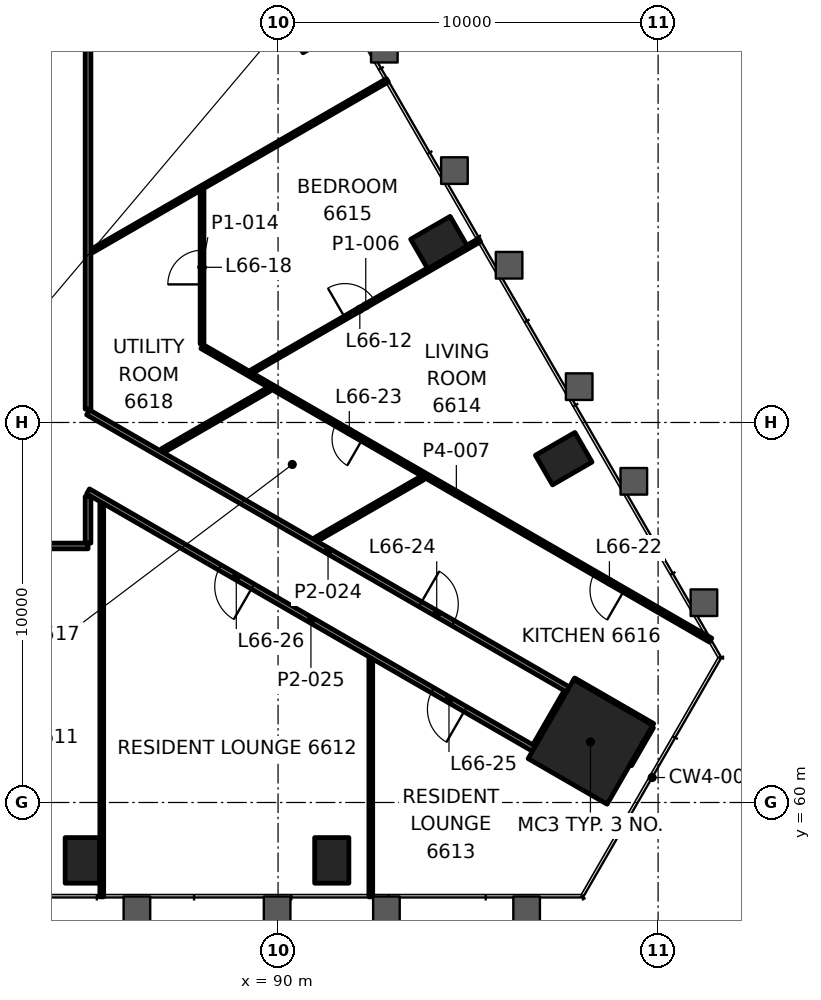
"""IFC4 building model, lengths in metres.
Left out: names, types, materials, properties, quantities, classifications, styles, units other than length and angle.
Written with IfcOpenShell. Run it as: python <this file> out.ifc"""

import sys

from ifc_helpers import new_model, si_unit, direction, frame, frame_2d, origin, origin_2d, place, context, subcontext, project, spatial, rectangle, hollow_rectangle, extrude, element, fill, save


model = new_model("IFC4")
c1 = context("Model", 3, precision=1e-05, world=origin(), true_north=direction((0.0, 1.0)))
c2 = subcontext(c1, "Body", "Model", "MODEL_VIEW")
j1 = project(units=[si_unit("LENGTHUNIT", "METRE"), si_unit("PLANEANGLEUNIT", "RADIAN")], contexts=[c1])
p1 = place(None, origin())
s1 = spatial("IfcSite", under=j1, at=p1, CompositionType="ELEMENT")
p2 = place(p1, origin())
s2 = spatial("IfcBuilding", under=s1, at=p2, CompositionType="ELEMENT")
p3 = place(p2, frame((0.0, 0.0, 277.6)))
s3 = spatial("IfcBuildingStorey", under=s2, at=p3, CompositionType="ELEMENT", Elevation=277.6)
p4 = place(p3, frame((98.22, 61.594, 0.0), z_axis=(0.0, 0.0, 1.0), x_axis=(0.5, 0.866025403784, 0.0)))
e1 = element("IfcColumn", 1, at=p4, inside=s3, PredefinedType="COLUMN", context=c2, shape_type="SweptSolid", body=[
    extrude(rectangle(XDim=2.4, YDim=2.4, at=origin_2d()), origin(), (0.0, 0.0, 1.0), 3.5),
])
for number, where, z_axis, x_axis in (
    (2, (84.848, 58.476, -0.0), (0.0, 0.0, 1.0), (1.0, 0.0, 0.0)),
    (3, (91.413, 58.476, -0.0), (0.0, 0.0, 1.0), (1.0, 0.0, 0.0)),
    (4, (97.517, 69.047, -0.0), (0.0, 0.0, 1.0), (-0.5, 0.866, 0.0)),
    (5, (94.234, 74.733, -0.0), (0.0, 0.0, 1.0), (-0.5, 0.866, 0.0)),
    (6, (90.951, 80.419, -0.0), (0.0, 0.0, 1.0), (-0.5, 0.866, 0.0)),
):
    element("IfcColumn", number, at=place(p3, frame(where, z_axis=z_axis, x_axis=x_axis)), inside=s3, PredefinedType="COLUMN", context=c2, shape_type="SweptSolid", body=[
        extrude(hollow_rectangle(XDim=0.9, YDim=1.2, WallThickness=0.06, at=origin_2d()), origin(), (0.0, 0.0, 1.0), 3.5),
    ])
p5 = place(p3, frame((85.0, 66.75, 0.0), z_axis=(0.0, 0.0, 1.0), x_axis=(-1.0, 0.0, 0.0)))
e7 = element("IfcWall", 7, at=p5, inside=s3, PredefinedType="PARTITIONING", context=c2, shape_type="SweptSolid", body=[
    extrude(rectangle(XDim=19.999, YDim=0.15, at=frame_2d((10.0, 0.0))), origin(), (0.0, 0.0, 1.0), 2.7),
])
p6 = place(p5, frame((2.96, 0.0, 0.0)))
e8 = element("IfcOpeningElement", 8, at=p6, cuts=e7, PredefinedType="OPENING", context=c2, shape_type="SweptSolid", body=[
    extrude(rectangle(XDim=1.0, YDim=2.1, at=frame_2d((0.5, 1.05))), frame((0.0, 0.085, 0.0), z_axis=(0.0, -1.0, 0.0), x_axis=(1.0, 0.0, 0.0)), (0.0, 0.0, 1.0), 0.17),
])
p7 = place(p5, frame((7.361, 0.0, 0.0)))
e9 = element("IfcOpeningElement", 9, at=p7, cuts=e7, PredefinedType="OPENING", context=c2, shape_type="SweptSolid", body=[
    extrude(rectangle(XDim=0.9, YDim=2.1, at=frame_2d((0.45, 1.05))), frame((0.0, 0.085, 0.0), z_axis=(0.0, -1.0, 0.0), x_axis=(1.0, 0.0, 0.0)), (0.0, 0.0, 1.0), 0.17),
])
p8 = place(p5, frame((9.55, 0.0, 0.0)))
e10 = element("IfcOpeningElement", 10, at=p8, cuts=e7, PredefinedType="OPENING", context=c2, shape_type="SweptSolid", body=[
    extrude(rectangle(XDim=0.9, YDim=2.1, at=frame_2d((0.45, 1.05))), frame((0.0, 0.085, 0.0), z_axis=(0.0, -1.0, 0.0), x_axis=(1.0, 0.0, 0.0)), (0.0, 0.0, 1.0), 0.17),
])
p9 = place(p5, frame((11.738, 0.0, 0.0)))
e11 = element("IfcOpeningElement", 11, at=p9, cuts=e7, PredefinedType="OPENING", context=c2, shape_type="SweptSolid", body=[
    extrude(rectangle(XDim=0.9, YDim=2.1, at=frame_2d((0.45, 1.05))), frame((0.0, 0.085, 0.0), z_axis=(0.0, -1.0, 0.0), x_axis=(1.0, 0.0, 0.0)), (0.0, 0.0, 1.0), 0.17),
])
p10 = place(p5, frame((13.926, 0.0, 0.0)))
e12 = element("IfcOpeningElement", 12, at=p10, cuts=e7, PredefinedType="OPENING", context=c2, shape_type="SweptSolid", body=[
    extrude(rectangle(XDim=0.9, YDim=2.1, at=frame_2d((0.45, 1.05))), frame((0.0, 0.085, 0.0), z_axis=(0.0, -1.0, 0.0), x_axis=(1.0, 0.0, 0.0)), (0.0, 0.0, 1.0), 0.17),
])
p11 = place(p3, frame((91.005, 66.926, 0.0), z_axis=(0.0, 0.0, 1.0), x_axis=(0.866000447062, 0.500043223821, 0.0)))
e13 = element("IfcWall", 13, at=p11, inside=s3, PredefinedType="PARTITIONING", context=c2, shape_type="SweptSolid", body=[
    extrude(rectangle(XDim=3.228, YDim=0.12, at=frame_2d((1.614, 0.0))), origin(), (0.0, 0.0, 1.0), 2.7),
])
p12 = place(p3, frame((86.963, 69.259, 0.0), z_axis=(0.0, 0.0, 1.0), x_axis=(0.866033195618, 0.499986503906, 0.0)))
e14 = element("IfcWall", 14, at=p12, inside=s3, PredefinedType="PARTITIONING", context=c2, shape_type="SweptSolid", body=[
    extrude(rectangle(XDim=3.228, YDim=0.12, at=frame_2d((1.614, 0.0))), origin(), (0.0, 0.0, 1.0), 2.7),
])
p13 = place(p3, frame((89.311, 71.34, 0.0), z_axis=(0.0, 0.0, 1.0), x_axis=(0.866013442838, 0.500020716395, 0.0)))
e15 = element("IfcWall", 15, at=p13, inside=s3, PredefinedType="PARTITIONING", context=c2, shape_type="SweptSolid", body=[
    extrude(rectangle(XDim=6.92, YDim=0.1, at=frame_2d((3.46, 0.0))), origin(), (0.0, 0.0, 1.0), 2.688),
])
p14 = place(p13, frame((2.83, 0.0, 0.0)))
e16 = element("IfcOpeningElement", 16, at=p14, cuts=e15, PredefinedType="OPENING", context=c2, shape_type="SweptSolid", body=[
    extrude(rectangle(XDim=0.9, YDim=2.1, at=frame_2d((0.45, 1.05))), frame((0.0, 0.06, 0.0), z_axis=(0.0, -1.0, 0.0), x_axis=(1.0, 0.0, 0.0)), (0.0, 0.0, 1.0), 0.12),
])
p15 = place(p3, frame((85.101, 74.514, 0.0), z_axis=(0.0, 0.0, 1.0), x_axis=(0.866020765707, 0.500008033299, 0.0)))
e17 = element("IfcWall", 17, at=p15, inside=s3, PredefinedType="PARTITIONING", context=c2, shape_type="SweptSolid", body=[
    extrude(rectangle(XDim=8.979, YDim=0.1, at=frame_2d((4.489, 0.0))), origin(), (0.0, 0.0, 1.0), 2.688),
])
p16 = place(p3, frame((99.259, 60.994, 0.0), z_axis=(0.0, 0.0, 1.0), x_axis=(0.499906209203, 0.866079547155, 0.0)))
e18 = element("IfcWall", 18, at=p16, inside=s3, PredefinedType="PARTITIONING", context=c2, shape_type="SweptSolid", body=[
    extrude(rectangle(XDim=1.15, YDim=0.1, at=frame_2d((0.575, 0.0))), origin(), (0.0, 0.0, 1.0), 2.7),
])
p17 = place(p3, frame((96.769, 61.48, 0.0), z_axis=(0.0, 0.0, 1.0), x_axis=(0.500035172766, 0.866005095826, 0.0)))
e19 = element("IfcWall", 19, at=p17, inside=s3, PredefinedType="PARTITIONING", context=c2, shape_type="SweptSolid", body=[
    extrude(rectangle(XDim=1.645, YDim=0.15, at=frame_2d((0.822, 0.0))), origin(), (0.0, 0.0, 1.0), 2.547),
])
p18 = place(p3, frame((92.44, 57.516, 0.0), z_axis=(0.0, 0.0, 1.0), x_axis=(0.0, 1.0, 0.0)))
e20 = element("IfcWall", 20, at=p18, inside=s3, PredefinedType="PARTITIONING", context=c2, shape_type="SweptSolid", body=[
    extrude(rectangle(XDim=6.259, YDim=0.1, at=frame_2d((3.129, 0.0))), origin(), (0.0, 0.0, 1.0), 2.7),
])
p19 = place(p3, frame((88.0, 72.067, 0.0), z_axis=(0.0, 0.0, 1.0), x_axis=(0.0, 1.0, 0.0)))
e21 = element("IfcWall", 21, at=p19, inside=s3, PredefinedType="PARTITIONING", context=c2, shape_type="SweptSolid", body=[
    extrude(rectangle(XDim=4.033, YDim=0.1, at=frame_2d((2.017, 0.0))), origin(), (0.0, 0.0, 1.0), 2.7),
])
p20 = place(p19, frame((1.567, 0.0, 0.0)))
e22 = element("IfcOpeningElement", 22, at=p20, cuts=e21, PredefinedType="OPENING", context=c2, shape_type="SweptSolid", body=[
    extrude(rectangle(XDim=0.9, YDim=2.1, at=frame_2d((0.45, 1.05))), frame((0.0, 0.06, 0.0), z_axis=(0.0, -1.0, 0.0), x_axis=(1.0, 0.0, 0.0)), (0.0, 0.0, 1.0), 0.12),
])
p21 = place(p3, frame((85.361, 57.516, 0.0), z_axis=(0.0, 0.0, 1.0), x_axis=(0.0, 1.0, 0.0)))
e23 = element("IfcWall", 23, at=p21, inside=s3, PredefinedType="PARTITIONING", context=c2, shape_type="SweptSolid", body=[
    extrude(rectangle(XDim=10.346, YDim=0.1, at=frame_2d((5.173, 0.0))), origin(), (0.0, 0.0, 1.0), 2.547),
])
p22 = place(p3, frame((85.0, 66.825, 0.0), z_axis=(0.0, 0.0, 1.0), x_axis=(0.0, 1.0, 0.0)))
e24 = element("IfcWall", 24, at=p22, inside=s3, PredefinedType="PARTITIONING", context=c2, shape_type="SweptSolid", body=[
    extrude(rectangle(XDim=1.225, YDim=0.15, at=frame_2d((0.613, 0.0))), origin(), (0.0, 0.0, 1.0), 2.547),
])
p23 = place(p3, frame((85.0, 70.352, 0.0), z_axis=(0.0, 0.0, 1.0), x_axis=(0.0, 1.0, 0.0)))
e25 = element("IfcWall", 25, at=p23, inside=s3, PredefinedType="PARTITIONING", context=c2, shape_type="SweptSolid", body=[
    extrude(rectangle(XDim=12.897, YDim=0.15, at=frame_2d((6.449, 0.0))), origin(), (0.0, 0.0, 1.0), 2.7),
])
p24 = place(p3, frame((101.383, 64.271, 0.0), z_axis=(0.0, 0.0, 1.0), x_axis=(-0.86602851656, 0.499994608475, 0.0)))
e26 = element("IfcWall", 26, at=p24, inside=s3, PredefinedType="PARTITIONING", context=c2, shape_type="SweptSolid", body=[
    extrude(rectangle(XDim=15.453, YDim=0.12, at=frame_2d((7.727, 0.0))), origin(), (0.0, 0.0, 1.0), 2.7),
])
p25 = place(p24, frame((2.626, 0.0, 0.0)))
e27 = element("IfcOpeningElement", 27, at=p25, cuts=e26, PredefinedType="OPENING", context=c2, shape_type="SweptSolid", body=[
    extrude(rectangle(XDim=0.9, YDim=2.1, at=frame_2d((0.45, 1.05))), frame((0.0, 0.07, 0.0), z_axis=(0.0, -1.0, 0.0), x_axis=(1.0, 0.0, 0.0)), (0.0, 0.0, 1.0), 0.14),
])
p26 = place(p24, frame((10.579, 0.0, 0.0)))
e28 = element("IfcOpeningElement", 28, at=p26, cuts=e26, PredefinedType="OPENING", context=c2, shape_type="SweptSolid", body=[
    extrude(rectangle(XDim=0.8, YDim=2.1, at=frame_2d((0.4, 1.05))), frame((0.0, 0.07, 0.0), z_axis=(0.0, -1.0, 0.0), x_axis=(1.0, 0.0, 0.0)), (0.0, 0.0, 1.0), 0.14),
])
p27 = place(p3, frame((99.859, 62.033, 0.0), z_axis=(0.0, 0.0, 1.0), x_axis=(-0.866050077142, 0.499957262057, 0.0)))
e29 = element("IfcWall", 29, at=p27, inside=s3, PredefinedType="PARTITIONING", context=c2, shape_type="SweptSolid", body=[
    extrude(rectangle(XDim=2.4, YDim=0.1, at=frame_2d((1.2, 0.0))), origin(), (0.0, 0.0, 1.0), 2.7),
])
p28 = place(p3, frame((85.0, 70.266, 0.0), z_axis=(0.0, 0.0, 1.0), x_axis=(0.866026970734, -0.499997285954, 0.0)))
e30 = element("IfcWall", 30, at=p28, inside=s3, PredefinedType="PARTITIONING", context=c2, shape_type="SweptSolid", body=[
    extrude(rectangle(XDim=14.584, YDim=0.15, at=frame_2d((7.292, 0.0))), origin(), (0.0, 0.0, 1.0), 2.7),
])
p29 = place(p28, frame((10.094, 0.0, 0.0)))
e31 = element("IfcOpeningElement", 31, at=p29, cuts=e30, PredefinedType="OPENING", context=c2, shape_type="SweptSolid", body=[
    extrude(rectangle(XDim=1.0, YDim=2.1, at=frame_2d((0.5, 1.05))), frame((0.0, 0.085, 0.0), z_axis=(0.0, -1.0, 0.0), x_axis=(1.0, 0.0, 0.0)), (0.0, 0.0, 1.0), 0.17),
])
p30 = place(p3, frame((96.73, 61.415, 0.0), z_axis=(0.0, 0.0, 1.0), x_axis=(-0.866032805753, 0.499987179195, 0.0)))
e32 = element("IfcWall", 32, at=p30, inside=s3, PredefinedType="PARTITIONING", context=c2, shape_type="SweptSolid", body=[
    extrude(rectangle(XDim=13.545, YDim=0.15, at=frame_2d((6.772, 0.0))), origin(), (0.0, 0.0, 1.0), 2.547),
])
p31 = place(p30, frame((2.078, 0.0, 0.0)))
e33 = element("IfcOpeningElement", 33, at=p31, cuts=e32, PredefinedType="OPENING", context=c2, shape_type="SweptSolid", body=[
    extrude(rectangle(XDim=1.0, YDim=2.1, at=frame_2d((0.5, 1.05))), frame((0.0, 0.085, 0.0), z_axis=(0.0, -1.0, 0.0), x_axis=(1.0, 0.0, 0.0)), (0.0, 0.0, 1.0), 0.17),
])
p32 = place(p30, frame((8.54, 0.0, 0.0)))
e34 = element("IfcOpeningElement", 34, at=p32, cuts=e32, PredefinedType="OPENING", context=c2, shape_type="SweptSolid", body=[
    extrude(rectangle(XDim=1.0, YDim=2.1, at=frame_2d((0.5, 1.05))), frame((0.0, 0.085, 0.0), z_axis=(0.0, -1.0, 0.0), x_axis=(1.0, 0.0, 0.0)), (0.0, 0.0, 1.0), 0.17),
])
p33 = place(p14, origin())
e35 = element("IfcDoor", 35, at=p33, inside=s3, OperationType="SINGLE_SWING_LEFT", PredefinedType="DOOR", context=c2, shape_type="SweptSolid", body=[
    extrude(rectangle(XDim=0.9, YDim=2.1, at=frame_2d((0.45, 1.05))), frame((0.0, 0.025, 0.0), z_axis=(0.0, -1.0, 0.0), x_axis=(1.0, 0.0, 0.0)), (0.0, 0.0, 1.0), 0.05),
])
fill(e16, e35)
p34 = place(p20, origin())
e36 = element("IfcDoor", 36, at=p34, inside=s3, OperationType="SINGLE_SWING_LEFT", PredefinedType="DOOR", context=c2, shape_type="SweptSolid", body=[
    extrude(rectangle(XDim=0.9, YDim=2.1, at=frame_2d((0.45, 1.05))), frame((0.0, 0.025, 0.0), z_axis=(0.0, -1.0, 0.0), x_axis=(1.0, 0.0, 0.0)), (0.0, 0.0, 1.0), 0.05),
])
fill(e22, e36)
p35 = place(p25, origin())
e37 = element("IfcDoor", 37, at=p35, inside=s3, OperationType="SINGLE_SWING_LEFT", PredefinedType="DOOR", context=c2, shape_type="SweptSolid", body=[
    extrude(rectangle(XDim=0.9, YDim=2.1, at=frame_2d((0.45, 1.05))), frame((0.0, 0.025, 0.0), z_axis=(0.0, -1.0, 0.0), x_axis=(1.0, 0.0, 0.0)), (0.0, 0.0, 1.0), 0.05),
])
fill(e27, e37)
p36 = place(p26, origin())
e38 = element("IfcDoor", 38, at=p36, inside=s3, OperationType="SINGLE_SWING_RIGHT", PredefinedType="DOOR", context=c2, shape_type="SweptSolid", body=[
    extrude(rectangle(XDim=0.8, YDim=2.1, at=frame_2d((0.4, 1.05))), frame((0.0, 0.025, 0.0), z_axis=(0.0, -1.0, 0.0), x_axis=(1.0, 0.0, 0.0)), (0.0, 0.0, 1.0), 0.05),
])
fill(e28, e38)
p37 = place(p29, origin())
e39 = element("IfcDoor", 39, at=p37, inside=s3, OperationType="SINGLE_SWING_LEFT", PredefinedType="DOOR", context=c2, shape_type="SweptSolid", body=[
    extrude(rectangle(XDim=1.0, YDim=2.1, at=frame_2d((0.5, 1.05))), frame((0.0, 0.025, 0.0), z_axis=(0.0, -1.0, 0.0), x_axis=(1.0, 0.0, 0.0)), (0.0, 0.0, 1.0), 0.05),
])
fill(e31, e39)
p38 = place(p31, origin())
e40 = element("IfcDoor", 40, at=p38, inside=s3, OperationType="SINGLE_SWING_RIGHT", PredefinedType="DOOR", context=c2, shape_type="SweptSolid", body=[
    extrude(rectangle(XDim=1.0, YDim=2.1, at=frame_2d((0.5, 1.05))), frame((0.0, 0.025, 0.0), z_axis=(0.0, -1.0, 0.0), x_axis=(1.0, 0.0, 0.0)), (0.0, 0.0, 1.0), 0.05),
])
fill(e33, e40)
p39 = place(p32, origin())
e41 = element("IfcDoor", 41, at=p39, inside=s3, OperationType="SINGLE_SWING_LEFT", PredefinedType="DOOR", context=c2, shape_type="SweptSolid", body=[
    extrude(rectangle(XDim=1.0, YDim=2.1, at=frame_2d((0.5, 1.05))), frame((0.0, 0.025, 0.0), z_axis=(0.0, -1.0, 0.0), x_axis=(1.0, 0.0, 0.0)), (0.0, 0.0, 1.0), 0.05),
])
fill(e34, e41)
save(model, sys.argv[1])
